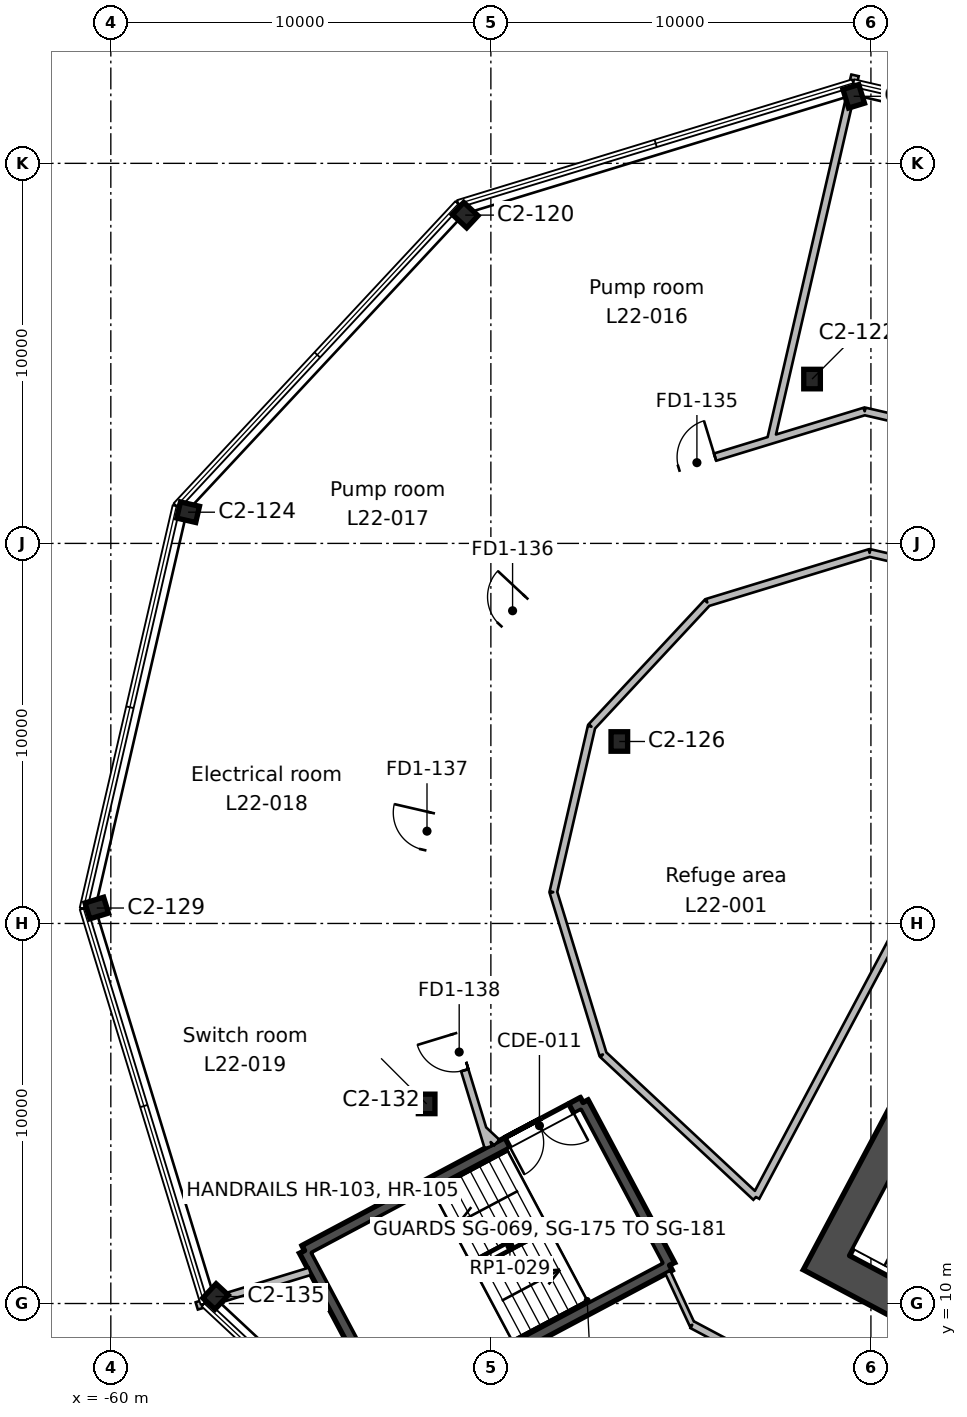
"""IFC4 building model, lengths in metres.
Left out: names, types, materials, properties, quantities, classifications, styles, units other than length and angle.
Written with IfcOpenShell. Run it as: python <this file> out.ifc"""

import sys

from ifc_helpers import new_model, si_unit, direction, frame, frame_2d, origin, origin_2d, place, context, subcontext, project, spatial, rectangle, i_section, extrude, element, fill, save


model = new_model("IFC4")
c1 = context("Model", 3, precision=1e-05, world=origin(), true_north=direction((0.0, 1.0)))
c2 = subcontext(c1, "Body", "Model", "MODEL_VIEW")
j1 = project(units=[si_unit("LENGTHUNIT", "METRE"), si_unit("PLANEANGLEUNIT", "RADIAN")], contexts=[c1])
p1 = place(None, origin())
s1 = spatial("IfcSite", under=j1, at=p1, CompositionType="ELEMENT")
p2 = place(p1, origin())
s2 = spatial("IfcBuilding", under=s1, at=p2, CompositionType="ELEMENT")
p3 = place(p2, frame((0.0, 0.0, 112.2)))
s3 = spatial("IfcBuildingStorey", under=s2, at=p3, CompositionType="ELEMENT", Elevation=112.2)
for number, where, z_axis, x_axis in (
    (1, (-57.245, 10.183, 0.0), (0.0, 0.0, 1.0), (0.731, -0.682, 0.0)),
    (2, (-51.69, 15.252, 0.0), (0.0, 0.0, 1.0), (1.0, 0.0, 0.0)),
    (3, (-60.37, 20.406, 0.0), (0.0, 0.0, 1.0), (0.292, -0.956, 0.0)),
    (4, (-46.62, 24.788, 0.0), (0.0, 0.0, 1.0), (1.0, 0.0, 0.0)),
    (5, (-57.966, 30.821, 0.0), (0.0, 0.0, 1.0), (-0.225, -0.974, 0.0)),
    (6, (-41.549, 34.324, 0.0), (0.0, 0.0, 1.0), (1.0, 0.0, 0.0)),
    (7, (-50.675, 38.638, 0.0), (0.0, 0.0, 1.0), (-0.682, -0.731, 0.0)),
    (8, (-40.453, 41.764, 0.0), (0.0, 0.0, 1.0), (-0.956, -0.292, 0.0)),
):
    element("IfcColumn", number, at=place(p3, frame(where, z_axis=z_axis, x_axis=x_axis)), inside=s3, PredefinedType="COLUMN", context=c2, shape_type="SweptSolid", body=[
        extrude(i_section(OverallWidth=0.437, OverallDepth=0.513, WebThickness=0.061, FlangeThickness=0.097, FilletRadius=0.015, at=origin_2d()), origin(), (0.0, 0.0, 1.0), 6.0),
    ])
p4 = place(p3, frame((-31.992, 28.336, 0.0), z_axis=(0.0, 0.0, 1.0), x_axis=(-0.46947084998, -0.882947971864, 0.0)))
e9 = element("IfcWall", 9, at=p4, inside=s3, PredefinedType="SHEAR", context=c2, shape_type="SweptSolid", body=[
    extrude(rectangle(XDim=20.0, YDim=0.9, at=frame_2d((10.0, 0.0))), origin(), (0.0, 0.0, 1.0), 6.0),
])
p5 = place(p4, frame((10.6, 0.0, 0.0)))
e10 = element("IfcOpeningElement", 10, at=p5, cuts=e9, PredefinedType="OPENING", context=c2, shape_type="SweptSolid", body=[
    extrude(rectangle(XDim=2.4, YDim=2.4, at=frame_2d((1.2, 1.2))), frame((0.0, 0.46, 0.0), z_axis=(0.0, -1.0, 0.0), x_axis=(1.0, 0.0, 0.0)), (0.0, 0.0, 1.0), 0.92),
])
p6 = place(p3, frame((-22.937, 1.38, 0.0), z_axis=(0.0, 0.0, 1.0), x_axis=(-0.88295276571, 0.46946183394, 0.0)))
e11 = element("IfcWall", 11, at=p6, inside=s3, PredefinedType="SHEAR", context=c2, shape_type="SweptSolid", body=[
    extrude(rectangle(XDim=20.2, YDim=0.9, at=frame_2d((10.1, 0.0))), origin(), (0.0, 0.0, 1.0), 6.0),
])
p7 = place(p3, frame((-47.574, 15.29, 0.0), z_axis=(0.0, 0.0, 1.0), x_axis=(0.469443498566, -0.882962514297, 0.0)))
e12 = element("IfcWall", 12, at=p7, inside=s3, PredefinedType="SHEAR", context=c2, shape_type="SweptSolid", body=[
    extrude(rectangle(XDim=4.85, YDim=0.3, at=frame_2d((2.425, 0.0))), origin(), (0.0, 0.0, 1.0), 6.0),
])
p8 = place(p3, frame((-45.297, 11.007, 0.0), z_axis=(0.0, 0.0, 1.0), x_axis=(-0.882951519127, -0.469464178475, 0.0)))
e13 = element("IfcWall", 13, at=p8, inside=s3, PredefinedType="SHEAR", context=c2, shape_type="SweptSolid", body=[
    extrude(rectangle(XDim=8.3, YDim=0.3, at=frame_2d((4.15, 0.0))), origin(), (0.0, 0.0, 1.0), 6.0),
])
p9 = place(p3, frame((-52.626, 7.111, 0.0), z_axis=(0.0, 0.0, 1.0), x_axis=(-0.469464364128, 0.882951420416, 0.0)))
e14 = element("IfcWall", 14, at=p9, inside=s3, PredefinedType="SHEAR", context=c2, shape_type="SweptSolid", body=[
    extrude(rectangle(XDim=4.85, YDim=0.3, at=frame_2d((2.425, 0.0))), origin(), (0.0, 0.0, 1.0), 6.0),
])
p10 = place(p3, frame((-54.903, 11.393, 0.0), z_axis=(0.0, 0.0, 1.0), x_axis=(0.882939326045, 0.469487110071, 0.0)))
e15 = element("IfcWall", 15, at=p10, inside=s3, PredefinedType="SHEAR", context=c2, shape_type="SweptSolid", body=[
    extrude(rectangle(XDim=8.3, YDim=0.3, at=frame_2d((4.15, 0.0))), origin(), (0.0, 0.0, 1.0), 6.0),
])
p11 = place(p10, frame((6.05, 0.0, 0.0)))
e16 = element("IfcOpeningElement", 16, at=p11, cuts=e15, PredefinedType="OPENING", context=c2, shape_type="SweptSolid", body=[
    extrude(rectangle(XDim=1.9, YDim=2.1, at=frame_2d((0.95, 1.05))), frame((0.0, 0.16, 0.0), z_axis=(0.0, -1.0, 0.0), x_axis=(1.0, 0.0, 0.0)), (0.0, 0.0, 1.0), 0.32),
])
p12 = place(p3, frame((-51.325, 18.224, 0.0), z_axis=(0.0, 0.0, 1.0), x_axis=(-0.974366960298, 0.224964500933, 0.0)))
e17 = element("IfcWall", 17, at=p12, inside=s3, PredefinedType="PARTITIONING", context=c2, shape_type="SweptSolid", body=[
    extrude(rectangle(XDim=9.85, YDim=0.2, at=frame_2d((4.925, 0.0))), origin(), (0.0, 0.0, 1.0), 5.55),
])
p13 = place(p3, frame((-58.427, 31.125, 0.0), z_axis=(0.0, 0.0, 1.0), x_axis=(0.731448342055, -0.6818968565, 0.0)))
e18 = element("IfcWall", 18, at=p13, inside=s3, PredefinedType="PARTITIONING", context=c2, shape_type="SweptSolid", body=[
    extrude(rectangle(XDim=9.849, YDim=0.2, at=frame_2d((4.925, 0.0))), origin(), (0.0, 0.0, 1.0), 5.55),
])
p14 = place(p3, frame((-54.761, 10.848, 0.0), z_axis=(0.0, 0.0, 1.0), x_axis=(-0.956301064033, -0.29238378021, 0.0)))
e19 = element("IfcWall", 19, at=p14, inside=s3, PredefinedType="PARTITIONING", context=c2, shape_type="SweptSolid", body=[
    extrude(rectangle(XDim=3.115, YDim=0.2, at=frame_2d((1.558, 0.0))), origin(), (0.0, 0.0, 1.0), 5.55),
])
p15 = place(p3, frame((-51.21, 24.467, 0.0), z_axis=(0.0, 0.0, 1.0), x_axis=(-0.225016103529, -0.97435504471, 0.0)))
e20 = element("IfcWall", 20, at=p15, inside=s3, PredefinedType="PARTITIONING", context=c2, shape_type="SweptSolid", body=[
    extrude(rectangle(XDim=3.871, YDim=0.2, at=frame_2d((1.936, 0.0))), origin(), (0.0, 0.0, 1.0), 5.55),
])
p16 = place(p15, frame((1.592, 0.0, 0.0)))
e21 = element("IfcOpeningElement", 21, at=p16, cuts=e20, PredefinedType="OPENING", context=c2, shape_type="SweptSolid", body=[
    extrude(rectangle(XDim=1.0, YDim=2.1, at=frame_2d((0.5, 1.05))), frame((0.0, 0.11, 0.0), z_axis=(0.0, -1.0, 0.0), x_axis=(1.0, 0.0, 0.0)), (0.0, 0.0, 1.0), 0.22),
])
p17 = place(p3, frame((-52.081, 20.695, 0.0), z_axis=(0.0, 0.0, 1.0), x_axis=(0.29271968539, -0.956198298359, 0.0)))
e22 = element("IfcWall", 22, at=p17, inside=s3, PredefinedType="PARTITIONING", context=c2, shape_type="SweptSolid", body=[
    extrude(rectangle(XDim=2.525, YDim=0.2, at=frame_2d((1.262, 0.0))), origin(), (0.0, 0.0, 1.0), 5.55),
])
p18 = place(p3, frame((-51.138, 17.613, 0.0), z_axis=(0.0, 0.0, 1.0), x_axis=(-0.292218535599, 0.956351571051, 0.0)))
e23 = element("IfcWall", 23, at=p18, inside=s3, PredefinedType="PARTITIONING", context=c2, shape_type="SweptSolid", body=[
    extrude(rectangle(XDim=0.698, YDim=0.2, at=frame_2d((0.349, 0.0))), origin(), (0.0, 0.0, 1.0), 5.55),
])
p19 = place(p3, frame((-48.002, 29.758, 0.0), z_axis=(0.0, 0.0, 1.0), x_axis=(-0.682017084098, -0.731336240725, 0.0)))
e24 = element("IfcWall", 24, at=p19, inside=s3, PredefinedType="PARTITIONING", context=c2, shape_type="SweptSolid", body=[
    extrude(rectangle(XDim=3.871, YDim=0.2, at=frame_2d((1.936, 0.0))), origin(), (0.0, 0.0, 1.0), 5.55),
])
p20 = place(p19, frame((1.592, 0.0, 0.0)))
e25 = element("IfcOpeningElement", 25, at=p20, cuts=e24, PredefinedType="OPENING", context=c2, shape_type="SweptSolid", body=[
    extrude(rectangle(XDim=1.0, YDim=2.1, at=frame_2d((0.5, 1.05))), frame((0.0, 0.11, 0.0), z_axis=(0.0, -1.0, 0.0), x_axis=(1.0, 0.0, 0.0)), (0.0, 0.0, 1.0), 0.22),
])
p21 = place(p3, frame((-50.642, 26.927, 0.0), z_axis=(0.0, 0.0, 1.0), x_axis=(-0.224930131566, -0.974374894952, 0.0)))
e26 = element("IfcWall", 26, at=p21, inside=s3, PredefinedType="PARTITIONING", context=c2, shape_type="SweptSolid", body=[
    extrude(rectangle(XDim=2.525, YDim=0.2, at=frame_2d((1.262, 0.0))), origin(), (0.0, 0.0, 1.0), 5.55),
])
p22 = place(p3, frame((-49.844, 14.237, 0.0), z_axis=(0.0, 0.0, 1.0), x_axis=(-0.731249387005, 0.682110206641, 0.0)))
e27 = element("IfcWall", 27, at=p22, inside=s3, PredefinedType="PARTITIONING", context=c2, shape_type="SweptSolid", body=[
    extrude(rectangle(XDim=0.502, YDim=0.2, at=frame_2d((0.251, 0.0))), origin(), (0.0, 0.0, 1.0), 5.55),
])
p23 = place(p3, frame((-50.07, 14.115, 0.0), z_axis=(0.0, 0.0, 1.0), x_axis=(-0.292133732264, 0.956377479071, 0.0)))
e28 = element("IfcWall", 28, at=p23, inside=s3, PredefinedType="PARTITIONING", context=c2, shape_type="SweptSolid", body=[
    extrude(rectangle(XDim=3.657, YDim=0.2, at=frame_2d((1.829, 0.0))), origin(), (0.0, 0.0, 1.0), 5.55),
])
p24 = place(p23, frame((2.115, 0.0, 0.0)))
e29 = element("IfcOpeningElement", 29, at=p24, cuts=e28, PredefinedType="OPENING", context=c2, shape_type="SweptSolid", body=[
    extrude(rectangle(XDim=1.0, YDim=2.1, at=frame_2d((0.5, 1.05))), frame((0.0, 0.11, 0.0), z_axis=(0.0, -1.0, 0.0), x_axis=(1.0, 0.0, 0.0)), (0.0, 0.0, 1.0), 0.22),
])
p25 = place(p3, frame((-50.922, 39.133, 0.0), z_axis=(0.0, 0.0, 1.0), x_axis=(0.292442735983, -0.956283036643, 0.0)))
e30 = element("IfcWall", 30, at=p25, inside=s3, PredefinedType="PARTITIONING", context=c2, shape_type="SweptSolid", body=[
    extrude(rectangle(XDim=9.849, YDim=0.2, at=frame_2d((4.924, 0.0))), origin(), (0.0, 0.0, 1.0), 5.55),
])
p26 = place(p3, frame((-48.138, 21.769, 0.0), z_axis=(0.0, 0.0, 1.0), x_axis=(0.224971658891, 0.974365307621, 0.0)))
e31 = element("IfcWall", 31, at=p26, inside=s3, PredefinedType="PARTITIONING", context=c2, shape_type="SweptSolid", body=[
    extrude(rectangle(XDim=3.498, YDim=0.2, at=frame_2d((1.749, 0.0))), origin(), (0.0, 0.0, 1.0), 5.55),
])
p27 = place(p3, frame((-47.351, 25.177, 0.0), z_axis=(0.0, 0.0, 1.0), x_axis=(0.681950982626, 0.731397878925, 0.0)))
e32 = element("IfcWall", 32, at=p27, inside=s3, PredefinedType="PARTITIONING", context=c2, shape_type="SweptSolid", body=[
    extrude(rectangle(XDim=2.464, YDim=0.2, at=frame_2d((1.232, 0.0))), origin(), (0.0, 0.0, 1.0), 5.55),
])
p28 = place(p3, frame((-43.026, 12.802, 0.0), z_axis=(0.0, 0.0, 1.0), x_axis=(-0.731412266015, 0.68193555203, 0.0)))
e33 = element("IfcWall", 33, at=p28, inside=s3, PredefinedType="PARTITIONING", context=c2, shape_type="SweptSolid", body=[
    extrude(rectangle(XDim=5.502, YDim=0.2, at=frame_2d((2.751, 0.0))), origin(), (0.0, 0.0, 1.0), 5.55),
])
p29 = place(p3, frame((-47.05, 16.554, 0.0), z_axis=(0.0, 0.0, 1.0), x_axis=(-0.292399072869, 0.956296388253, 0.0)))
e34 = element("IfcWall", 34, at=p29, inside=s3, PredefinedType="PARTITIONING", context=c2, shape_type="SweptSolid", body=[
    extrude(rectangle(XDim=4.466, YDim=0.2, at=frame_2d((2.233, 0.0))), origin(), (0.0, 0.0, 1.0), 5.55),
])
p30 = place(p3, frame((-48.356, 20.825, 0.0), z_axis=(0.0, 0.0, 1.0), x_axis=(0.225006720931, 0.974357211466, 0.0)))
e35 = element("IfcWall", 35, at=p30, inside=s3, PredefinedType="PARTITIONING", context=c2, shape_type="SweptSolid", body=[
    extrude(rectangle(XDim=0.969, YDim=0.2, at=frame_2d((0.484, 0.0))), origin(), (0.0, 0.0, 1.0), 5.55),
])
p31 = place(p3, frame((-42.602, 32.729, 0.0), z_axis=(0.0, 0.0, 1.0), x_axis=(-0.956266283447, -0.292497513052, 0.0)))
e36 = element("IfcWall", 36, at=p31, inside=s3, PredefinedType="PARTITIONING", context=c2, shape_type="SweptSolid", body=[
    extrude(rectangle(XDim=3.846, YDim=0.2, at=frame_2d((1.923, 0.0))), origin(), (0.0, 0.0, 1.0), 5.55),
])
p32 = place(p31, frame((1.567, 0.0, 0.0)))
e37 = element("IfcOpeningElement", 37, at=p32, cuts=e36, PredefinedType="OPENING", context=c2, shape_type="SweptSolid", body=[
    extrude(rectangle(XDim=1.0, YDim=2.1, at=frame_2d((0.5, 1.05))), frame((0.0, 0.11, 0.0), z_axis=(0.0, -1.0, 0.0), x_axis=(1.0, 0.0, 0.0)), (0.0, 0.0, 1.0), 0.22),
])
p33 = place(p3, frame((-46.28, 31.604, 0.0), z_axis=(0.0, 0.0, 1.0), x_axis=(-0.682114920483, -0.731244989901, 0.0)))
e38 = element("IfcWall", 38, at=p33, inside=s3, PredefinedType="PARTITIONING", context=c2, shape_type="SweptSolid", body=[
    extrude(rectangle(XDim=2.524, YDim=0.2, at=frame_2d((1.262, 0.0))), origin(), (0.0, 0.0, 1.0), 5.55),
])
p34 = place(p3, frame((-40.034, 29.749, 0.0), z_axis=(0.0, 0.0, 1.0), x_axis=(-0.956357512161, -0.29219909126, 0.0)))
e39 = element("IfcWall", 39, at=p34, inside=s3, PredefinedType="PARTITIONING", context=c2, shape_type="SweptSolid", body=[
    extrude(rectangle(XDim=4.466, YDim=0.2, at=frame_2d((2.233, 0.0))), origin(), (0.0, 0.0, 1.0), 5.55),
])
p35 = place(p3, frame((-44.305, 28.444, 0.0), z_axis=(0.0, 0.0, 1.0), x_axis=(-0.681931663517, -0.731415891469, 0.0)))
e40 = element("IfcWall", 40, at=p35, inside=s3, PredefinedType="PARTITIONING", context=c2, shape_type="SweptSolid", body=[
    extrude(rectangle(XDim=2.003, YDim=0.2, at=frame_2d((1.001, 0.0))), origin(), (0.0, 0.0, 1.0), 5.55),
])
p36 = place(p3, frame((-8.114, -10.013, 0.0), z_axis=(0.0, 0.0, 1.0), x_axis=(-0.882945090575, 0.469476268866, 0.0)))
e41 = element("IfcWall", 41, at=p36, inside=s3, PredefinedType="PARTITIONING", context=c2, shape_type="SweptSolid", body=[
    extrude(rectangle(XDim=41.437, YDim=0.2, at=frame_2d((20.719, 0.0))), origin(), (0.0, 0.0, 1.0), 5.55),
])
p37 = place(p36, frame((21.45, 0.0, 0.0)))
e42 = element("IfcOpeningElement", 42, at=p37, cuts=e41, PredefinedType="OPENING", context=c2, shape_type="SweptSolid", body=[
    extrude(rectangle(XDim=1.0, YDim=2.1, at=frame_2d((0.5, 1.05))), frame((0.0, 0.11, 0.0), z_axis=(0.0, -1.0, 0.0), x_axis=(1.0, 0.0, 0.0)), (0.0, 0.0, 1.0), 0.22),
])
p38 = place(p36, frame((19.75, 0.0, 0.0)))
e43 = element("IfcOpeningElement", 43, at=p38, cuts=e41, PredefinedType="OPENING", context=c2, shape_type="SweptSolid", body=[
    extrude(rectangle(XDim=1.0, YDim=2.1, at=frame_2d((0.5, 1.05))), frame((0.0, 0.11, 0.0), z_axis=(0.0, -1.0, 0.0), x_axis=(1.0, 0.0, 0.0)), (0.0, 0.0, 1.0), 0.22),
])
p39 = place(p3, frame((-44.701, 9.441, 0.0), z_axis=(0.0, 0.0, 1.0), x_axis=(-0.421636193094, 0.906765085716, 0.0)))
e44 = element("IfcWall", 44, at=p39, inside=s3, PredefinedType="PARTITIONING", context=c2, shape_type="SweptSolid", body=[
    extrude(rectangle(XDim=1.53, YDim=0.15, at=frame_2d((0.765, 0.0))), origin(), (0.0, 0.0, 1.0), 5.55),
])
p40 = place(p3, frame((-39.826, 18.82, 0.0), z_axis=(0.0, 0.0, 1.0), x_axis=(-0.469481685648, -0.882942210363, 0.0)))
e45 = element("IfcWall", 45, at=p40, inside=s3, PredefinedType="PARTITIONING", context=c2, shape_type="SweptSolid", body=[
    extrude(rectangle(XDim=6.816, YDim=0.2, at=frame_2d((3.408, 0.0))), origin(), (0.0, 0.0, 1.0), 5.55),
])
p41 = place(p3, frame((-40.419, 42.315, 0.0), z_axis=(0.0, 0.0, 1.0), x_axis=(-0.224921063823, -0.974376988157, 0.0)))
e46 = element("IfcWall", 46, at=p41, inside=s3, PredefinedType="PARTITIONING", context=c2, shape_type="SweptSolid", body=[
    extrude(rectangle(XDim=9.848, YDim=0.2, at=frame_2d((4.924, 0.0))), origin(), (0.0, 0.0, 1.0), 5.55),
])
p42 = place(p3, frame((-35.068, 32.298, 0.0), z_axis=(0.0, 0.0, 1.0), x_axis=(-0.974389622126, 0.224866325386, 0.0)))
e47 = element("IfcWall", 47, at=p42, inside=s3, PredefinedType="PARTITIONING", context=c2, shape_type="SweptSolid", body=[
    extrude(rectangle(XDim=5.23, YDim=0.2, at=frame_2d((2.615, 0.0))), origin(), (0.0, 0.0, 1.0), 5.55),
])
p43 = place(p42, frame((2.15, 0.0, 0.0)))
e48 = element("IfcOpeningElement", 48, at=p43, cuts=e47, PredefinedType="OPENING", context=c2, shape_type="SweptSolid", body=[
    extrude(rectangle(XDim=1.0, YDim=2.1, at=frame_2d((0.5, 1.05))), frame((0.0, 0.11, 0.0), z_axis=(0.0, -1.0, 0.0), x_axis=(1.0, 0.0, 0.0)), (0.0, 0.0, 1.0), 0.22),
])
p44 = place(p3, frame((-40.164, 33.474, 0.0), z_axis=(0.0, 0.0, 1.0), x_axis=(-0.95633223978, -0.292281794092, 0.0)))
e49 = element("IfcWall", 49, at=p44, inside=s3, PredefinedType="PARTITIONING", context=c2, shape_type="SweptSolid", body=[
    extrude(rectangle(XDim=2.549, YDim=0.2, at=frame_2d((1.275, 0.0))), origin(), (0.0, 0.0, 1.0), 5.55),
])
p45 = place(p3, frame((-34.673, 28.512, 0.0), z_axis=(0.0, 0.0, 1.0), x_axis=(-0.974393439342, 0.224849784003, 0.0)))
e50 = element("IfcWall", 50, at=p45, inside=s3, PredefinedType="PARTITIONING", context=c2, shape_type="SweptSolid", body=[
    extrude(rectangle(XDim=5.502, YDim=0.2, at=frame_2d((2.751, 0.0))), origin(), (0.0, 0.0, 1.0), 5.55),
])
p46 = place(p3, frame((-34.673, 28.512, 0.0), z_axis=(0.0, 0.0, 1.0), x_axis=(-0.469440333182, -0.882964197226, 0.0)))
e51 = element("IfcWall", 51, at=p46, inside=s3, PredefinedType="PARTITIONING", context=c2, shape_type="SweptSolid", body=[
    extrude(rectangle(XDim=10.977, YDim=0.2, at=frame_2d((5.488, 0.0))), origin(), (0.0, 0.0, 1.0), 5.55),
])
p47 = place(p46, frame((4.95, 0.0, 0.0)))
e52 = element("IfcOpeningElement", 52, at=p47, cuts=e51, PredefinedType="OPENING", context=c2, shape_type="SweptSolid", body=[
    extrude(rectangle(XDim=1.0, YDim=2.1, at=frame_2d((0.5, 1.05))), frame((0.0, 0.11, 0.0), z_axis=(0.0, -1.0, 0.0), x_axis=(1.0, 0.0, 0.0)), (0.0, 0.0, 1.0), 0.22),
])
p48 = place(p11, frame((1.9, 0.0, 0.0), z_axis=(0.0, 0.0, 1.0), x_axis=(-1.0, 0.0, 0.0)))
e53 = element("IfcDoor", 53, at=p48, inside=s3, OperationType="DOUBLE_DOOR_SINGLE_SWING", PredefinedType="DOOR", context=c2, shape_type="SweptSolid", body=[
    extrude(rectangle(XDim=1.9, YDim=2.1, at=frame_2d((0.95, 1.05))), frame((0.0, 0.025, 0.0), z_axis=(0.0, -1.0, 0.0), x_axis=(1.0, 0.0, 0.0)), (0.0, 0.0, 1.0), 0.05),
])
fill(e16, e53)
p49 = place(p32, frame((1.0, 0.0, 0.0), z_axis=(0.0, 0.0, 1.0), x_axis=(-1.0, 0.0, 0.0)))
e54 = element("IfcDoor", 54, at=p49, inside=s3, OperationType="SINGLE_SWING_RIGHT", PredefinedType="DOOR", context=c2, shape_type="SweptSolid", body=[
    extrude(rectangle(XDim=1.0, YDim=2.1, at=frame_2d((0.5, 1.05))), frame((0.0, 0.025, 0.0), z_axis=(0.0, -1.0, 0.0), x_axis=(1.0, 0.0, 0.0)), (0.0, 0.0, 1.0), 0.05),
])
fill(e37, e54)
p50 = place(p20, frame((1.0, 0.0, 0.0), z_axis=(0.0, 0.0, 1.0), x_axis=(-1.0, 0.0, 0.0)))
e55 = element("IfcDoor", 55, at=p50, inside=s3, OperationType="SINGLE_SWING_RIGHT", PredefinedType="DOOR", context=c2, shape_type="SweptSolid", body=[
    extrude(rectangle(XDim=1.0, YDim=2.1, at=frame_2d((0.5, 1.05))), frame((0.0, 0.025, 0.0), z_axis=(0.0, -1.0, 0.0), x_axis=(1.0, 0.0, 0.0)), (0.0, 0.0, 1.0), 0.05),
])
fill(e25, e55)
p51 = place(p16, frame((1.0, 0.0, 0.0), z_axis=(0.0, 0.0, 1.0), x_axis=(-1.0, 0.0, 0.0)))
e56 = element("IfcDoor", 56, at=p51, inside=s3, OperationType="SINGLE_SWING_RIGHT", PredefinedType="DOOR", context=c2, shape_type="SweptSolid", body=[
    extrude(rectangle(XDim=1.0, YDim=2.1, at=frame_2d((0.5, 1.05))), frame((0.0, 0.025, 0.0), z_axis=(0.0, -1.0, 0.0), x_axis=(1.0, 0.0, 0.0)), (0.0, 0.0, 1.0), 0.05),
])
fill(e21, e56)
p52 = place(p24, origin())
e57 = element("IfcDoor", 57, at=p52, inside=s3, OperationType="SINGLE_SWING_RIGHT", PredefinedType="DOOR", context=c2, shape_type="SweptSolid", body=[
    extrude(rectangle(XDim=1.0, YDim=2.1, at=frame_2d((0.5, 1.05))), frame((0.0, 0.025, 0.0), z_axis=(0.0, -1.0, 0.0), x_axis=(1.0, 0.0, 0.0)), (0.0, 0.0, 1.0), 0.05),
])
fill(e29, e57)
save(model, sys.argv[1])
